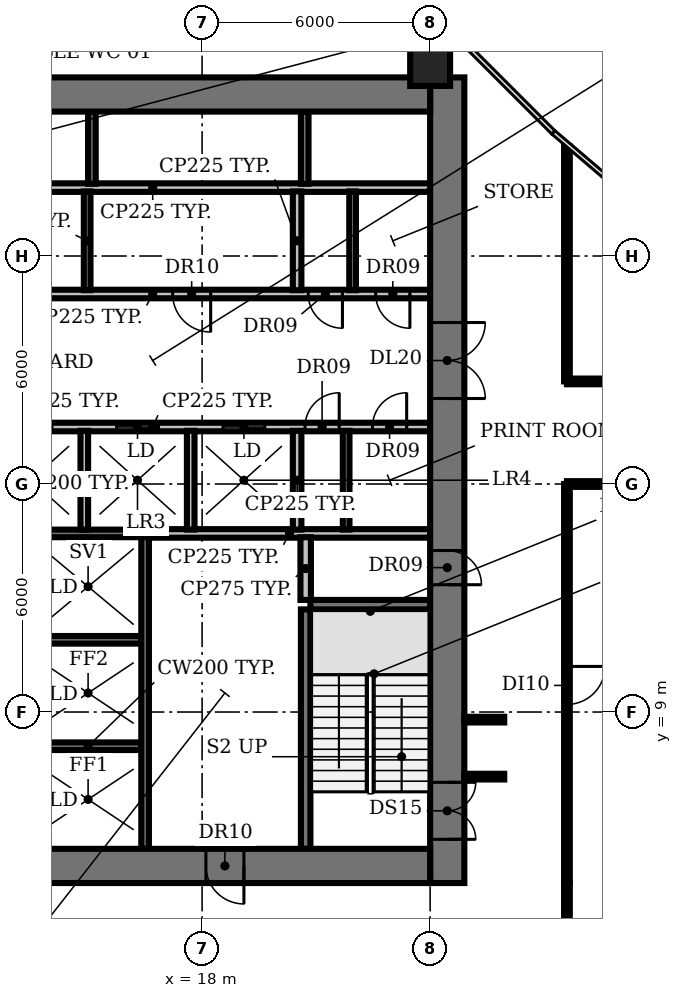
"""IFC4 building model, lengths in metres.
Left out: names, types, materials, properties, quantities, classifications, styles, units other than length and angle.
Written with IfcOpenShell. Run it as: python <this file> out.ifc"""

import sys

from ifc_helpers import new_model, si_unit, direction, frame, frame_2d, origin, origin_2d, place, context, subcontext, project, spatial, rectangle, circle, extrude, element, fill, save


model = new_model("IFC4")
c1 = context("Model", 3, precision=1e-05, world=origin(), true_north=direction((0.0, 1.0)))
c2 = subcontext(c1, "Body", "Model", "MODEL_VIEW")
j1 = project(units=[si_unit("LENGTHUNIT", "METRE"), si_unit("PLANEANGLEUNIT", "RADIAN")], contexts=[c1])
p1 = place(None, origin())
s1 = spatial("IfcSite", under=j1, at=p1, CompositionType="ELEMENT")
p2 = place(p1, origin())
s2 = spatial("IfcBuilding", under=s1, at=p2, CompositionType="ELEMENT")
p3 = place(p2, frame((0.0, 0.0, 71.0)))
s3 = spatial("IfcBuildingStorey", under=s2, at=p3, CompositionType="ELEMENT", Elevation=71.0)
p4 = place(p3, frame((24.0, 26.0, 0.0), z_axis=(0.0, 0.0, 1.0), x_axis=(1.0, 0.0, 0.0)))
e1 = element("IfcColumn", 1, at=p4, inside=s3, PredefinedType="COLUMN", context=c2, shape_type="SweptSolid", body=[
    extrude(circle(Radius=0.525, at=origin_2d()), origin(), (0.0, 0.0, 1.0), 3.85),
])
for number, where, z_axis, x_axis in (
    (2, (13.6, 8.1, 0.0), (0.0, 0.0, 1.0), (1.0, 0.0, 0.0)),
    (3, (13.6, 10.9, 0.0), (0.0, 0.0, 1.0), (1.0, 0.0, 0.0)),
):
    element("IfcWall", number, at=place(p3, frame(where, z_axis=z_axis, x_axis=x_axis)), inside=s3, PredefinedType="SHEAR", context=c2, shape_type="SweptSolid", body=[
        extrude(rectangle(XDim=2.8, YDim=0.2, at=frame_2d((1.4, 0.0))), origin(), (0.0, 0.0, 1.0), 3.85),
    ])
p5 = place(p3, frame((20.85, 11.825, 0.0), z_axis=(0.0, 0.0, 1.0), x_axis=(1.0, 0.0, 0.0)))
e4 = element("IfcWall", 4, at=p5, inside=s3, PredefinedType="SHEAR", context=c2, shape_type="SweptSolid", body=[
    extrude(rectangle(XDim=3.15, YDim=0.25, at=frame_2d((1.575, 0.0))), origin(), (0.0, 0.0, 1.0), 3.85),
])
p6 = place(p3, frame((13.6, 13.7, 0.0), z_axis=(0.0, 0.0, 1.0), x_axis=(1.0, 0.0, 0.0)))
e5 = element("IfcWall", 5, at=p6, inside=s3, PredefinedType="SHEAR", context=c2, shape_type="SweptSolid", body=[
    extrude(rectangle(XDim=2.8, YDim=0.2, at=frame_2d((1.4, 0.0))), origin(), (0.0, 0.0, 1.0), 3.85),
])
p7 = place(p3, frame((16.6, 13.7, 0.0), z_axis=(0.0, 0.0, 1.0), x_axis=(1.0, 0.0, 0.0)))
e6 = element("IfcWall", 6, at=p7, inside=s3, PredefinedType="PARTITIONING", context=c2, shape_type="SweptSolid", body=[
    extrude(rectangle(XDim=7.4, YDim=0.225, at=frame_2d((3.7, 0.0))), origin(), (0.0, 0.0, 1.0), 3.85),
])
p8 = place(p3, frame((9.4, 16.5, 0.0), z_axis=(0.0, 0.0, 1.0), x_axis=(1.0, 0.0, 0.0)))
e7 = element("IfcWall", 7, at=p8, inside=s3, PredefinedType="PARTITIONING", context=c2, shape_type="SweptSolid", body=[
    extrude(rectangle(XDim=14.6, YDim=0.225, at=frame_2d((7.3, 0.0))), origin(), (0.0, 0.0, 1.0), 3.85),
])
p9 = place(p8, frame((0.75, 0.0, 0.0)))
e8 = element("IfcOpeningElement", 8, at=p9, cuts=e7, PredefinedType="OPENING", context=c2, shape_type="SweptSolid", body=[
    extrude(rectangle(XDim=1.1, YDim=2.1, at=frame_2d((0.55, 1.05))), frame((0.0, 0.123, 0.0), z_axis=(0.0, -1.0, 0.0), x_axis=(1.0, 0.0, 0.0)), (0.0, 0.0, 1.0), 0.245),
])
p10 = place(p8, frame((3.55, 0.0, 0.0)))
e9 = element("IfcOpeningElement", 9, at=p10, cuts=e7, PredefinedType="OPENING", context=c2, shape_type="SweptSolid", body=[
    extrude(rectangle(XDim=1.1, YDim=2.1, at=frame_2d((0.55, 1.05))), frame((0.0, 0.123, 0.0), z_axis=(0.0, -1.0, 0.0), x_axis=(1.0, 0.0, 0.0)), (0.0, 0.0, 1.0), 0.245),
])
p11 = place(p8, frame((6.35, 0.0, 0.0)))
e10 = element("IfcOpeningElement", 10, at=p11, cuts=e7, PredefinedType="OPENING", context=c2, shape_type="SweptSolid", body=[
    extrude(rectangle(XDim=1.1, YDim=2.1, at=frame_2d((0.55, 1.05))), frame((0.0, 0.123, 0.0), z_axis=(0.0, -1.0, 0.0), x_axis=(1.0, 0.0, 0.0)), (0.0, 0.0, 1.0), 0.245),
])
p12 = place(p8, frame((9.15, 0.0, 0.0)))
e11 = element("IfcOpeningElement", 11, at=p12, cuts=e7, PredefinedType="OPENING", context=c2, shape_type="SweptSolid", body=[
    extrude(rectangle(XDim=1.1, YDim=2.1, at=frame_2d((0.55, 1.05))), frame((0.0, 0.123, 0.0), z_axis=(0.0, -1.0, 0.0), x_axis=(1.0, 0.0, 0.0)), (0.0, 0.0, 1.0), 0.245),
])
p13 = place(p8, frame((11.308, 0.0, 0.0)))
e12 = element("IfcOpeningElement", 12, at=p13, cuts=e7, PredefinedType="OPENING", context=c2, shape_type="SweptSolid", body=[
    extrude(rectangle(XDim=0.9, YDim=2.1, at=frame_2d((0.45, 1.05))), frame((0.0, 0.123, 0.0), z_axis=(0.0, -1.0, 0.0), x_axis=(1.0, 0.0, 0.0)), (0.0, 0.0, 1.0), 0.245),
])
p14 = place(p8, frame((13.083, 0.0, 0.0)))
e13 = element("IfcOpeningElement", 13, at=p14, cuts=e7, PredefinedType="OPENING", context=c2, shape_type="SweptSolid", body=[
    extrude(rectangle(XDim=0.9, YDim=2.1, at=frame_2d((0.45, 1.05))), frame((0.0, 0.123, 0.0), z_axis=(0.0, -1.0, 0.0), x_axis=(1.0, 0.0, 0.0)), (0.0, 0.0, 1.0), 0.245),
])
p15 = place(p3, frame((24.0, 20.0, 0.0), z_axis=(0.0, 0.0, 1.0), x_axis=(-1.0, 0.0, 0.0)))
e14 = element("IfcWall", 14, at=p15, inside=s3, PredefinedType="PARTITIONING", context=c2, shape_type="SweptSolid", body=[
    extrude(rectangle(XDim=14.6, YDim=0.225, at=frame_2d((7.3, 0.0))), origin(), (0.0, 0.0, 1.0), 3.85),
])
p16 = place(p15, frame((11.35, 0.0, 0.0)))
e15 = element("IfcOpeningElement", 15, at=p16, cuts=e14, PredefinedType="OPENING", context=c2, shape_type="SweptSolid", body=[
    extrude(rectangle(XDim=1.0, YDim=2.1, at=frame_2d((0.5, 1.05))), frame((0.0, 0.123, 0.0), z_axis=(0.0, -1.0, 0.0), x_axis=(1.0, 0.0, 0.0)), (0.0, 0.0, 1.0), 0.245),
])
p17 = place(p15, frame((5.775, 0.0, 0.0)))
e16 = element("IfcOpeningElement", 16, at=p17, cuts=e14, PredefinedType="OPENING", context=c2, shape_type="SweptSolid", body=[
    extrude(rectangle(XDim=1.0, YDim=2.1, at=frame_2d((0.5, 1.05))), frame((0.0, 0.123, 0.0), z_axis=(0.0, -1.0, 0.0), x_axis=(1.0, 0.0, 0.0)), (0.0, 0.0, 1.0), 0.245),
])
p18 = place(p15, frame((2.308, 0.0, 0.0)))
e17 = element("IfcOpeningElement", 17, at=p18, cuts=e14, PredefinedType="OPENING", context=c2, shape_type="SweptSolid", body=[
    extrude(rectangle(XDim=0.9, YDim=2.1, at=frame_2d((0.45, 1.05))), frame((0.0, 0.123, 0.0), z_axis=(0.0, -1.0, 0.0), x_axis=(1.0, 0.0, 0.0)), (0.0, 0.0, 1.0), 0.245),
])
p19 = place(p15, frame((0.532, 0.0, 0.0)))
e18 = element("IfcOpeningElement", 18, at=p19, cuts=e14, PredefinedType="OPENING", context=c2, shape_type="SweptSolid", body=[
    extrude(rectangle(XDim=0.9, YDim=2.1, at=frame_2d((0.45, 1.05))), frame((0.0, 0.123, 0.0), z_axis=(0.0, -1.0, 0.0), x_axis=(1.0, 0.0, 0.0)), (0.0, 0.0, 1.0), 0.245),
])
p20 = place(p3, frame((9.4, 22.8, 0.0), z_axis=(0.0, 0.0, 1.0), x_axis=(1.0, 0.0, 0.0)))
e19 = element("IfcWall", 19, at=p20, inside=s3, PredefinedType="PARTITIONING", context=c2, shape_type="SweptSolid", body=[
    extrude(rectangle(XDim=14.6, YDim=0.225, at=frame_2d((7.3, 0.0))), origin(), (0.0, 0.0, 1.0), 3.85),
])
p21 = place(p3, frame((14.9, 13.8, 0.0), z_axis=(0.0, 0.0, 1.0), x_axis=(0.0, 1.0, 0.0)))
e20 = element("IfcWall", 20, at=p21, inside=s3, PredefinedType="SOLIDWALL", context=c2, shape_type="SweptSolid", body=[
    extrude(rectangle(XDim=2.6, YDim=0.2, at=frame_2d((1.3, 0.0))), origin(), (0.0, 0.0, 1.0), 3.85),
])
p22 = place(p3, frame((14.975, 20.1, 0.0), z_axis=(0.0, 0.0, 1.0), x_axis=(0.0, 1.0, 0.0)))
e21 = element("IfcWall", 21, at=p22, inside=s3, PredefinedType="PARTITIONING", context=c2, shape_type="SweptSolid", body=[
    extrude(rectangle(XDim=2.6, YDim=0.175, at=frame_2d((1.3, 0.0))), origin(), (0.0, 0.0, 1.0), 3.85),
])
p23 = place(p3, frame((15.1, 22.9, 0.0), z_axis=(0.0, 0.0, 1.0), x_axis=(0.0, 1.0, 0.0)))
e22 = element("IfcWall", 22, at=p23, inside=s3, PredefinedType="SHEAR", context=c2, shape_type="SweptSolid", body=[
    extrude(rectangle(XDim=1.9, YDim=0.2, at=frame_2d((0.95, 0.0))), origin(), (0.0, 0.0, 1.0), 3.85),
])
p24 = place(p3, frame((16.5, 5.4, 0.0), z_axis=(0.0, 0.0, 1.0), x_axis=(0.0, 1.0, 0.0)))
e23 = element("IfcWall", 23, at=p24, inside=s3, PredefinedType="SHEAR", context=c2, shape_type="SweptSolid", body=[
    extrude(rectangle(XDim=8.2, YDim=0.2, at=frame_2d((4.1, 0.0))), origin(), (0.0, 0.0, 1.0), 3.85),
])
p25 = place(p3, frame((17.7, 13.8, 0.0), z_axis=(0.0, 0.0, 1.0), x_axis=(0.0, 1.0, 0.0)))
e24 = element("IfcWall", 24, at=p25, inside=s3, PredefinedType="SOLIDWALL", context=c2, shape_type="SweptSolid", body=[
    extrude(rectangle(XDim=2.6, YDim=0.2, at=frame_2d((1.3, 0.0))), origin(), (0.0, 0.0, 1.0), 3.85),
])
for number, where, z_axis, x_axis in (
    (25, (20.5, 13.8, 0.0), (0.0, 0.0, 1.0), (0.0, 1.0, 0.0)),
    (26, (20.5, 20.1, 0.0), (0.0, 0.0, 1.0), (0.0, 1.0, 0.0)),
):
    element("IfcWall", number, at=place(p3, frame(where, z_axis=z_axis, x_axis=x_axis)), inside=s3, PredefinedType="PARTITIONING", context=c2, shape_type="SweptSolid", body=[
        extrude(rectangle(XDim=2.6, YDim=0.225, at=frame_2d((1.3, 0.0))), origin(), (0.0, 0.0, 1.0), 3.85),
    ])
p26 = place(p3, frame((20.7, 22.9, 0.0), z_axis=(0.0, 0.0, 1.0), x_axis=(0.0, 1.0, 0.0)))
e27 = element("IfcWall", 27, at=p26, inside=s3, PredefinedType="SHEAR", context=c2, shape_type="SweptSolid", body=[
    extrude(rectangle(XDim=1.9, YDim=0.2, at=frame_2d((0.95, 0.0))), origin(), (0.0, 0.0, 1.0), 3.85),
])
p27 = place(p3, frame((20.725, 5.4, 0.0), z_axis=(0.0, 0.0, 1.0), x_axis=(0.0, 1.0, 0.0)))
e28 = element("IfcWall", 28, at=p27, inside=s3, PredefinedType="SHEAR", context=c2, shape_type="SweptSolid", body=[
    extrude(rectangle(XDim=6.3, YDim=0.25, at=frame_2d((3.15, 0.0))), origin(), (0.0, 0.0, 1.0), 3.85),
])
p28 = place(p3, frame((20.725, 11.95, 0.0), z_axis=(0.0, 0.0, 1.0), x_axis=(0.0, 1.0, 0.0)))
e29 = element("IfcWall", 29, at=p28, inside=s3, PredefinedType="PARTITIONING", context=c2, shape_type="SweptSolid", body=[
    extrude(rectangle(XDim=1.65, YDim=0.275, at=frame_2d((0.825, 0.0))), origin(), (0.0, 0.0, 1.0), 3.85),
])
for number, where, z_axis, x_axis in (
    (30, (21.79, 13.8, 0.0), (0.0, 0.0, 1.0), (0.0, 1.0, 0.0)),
    (31, (21.96, 20.1, 0.0), (0.0, 0.0, 1.0), (0.0, 1.0, 0.0)),
):
    element("IfcWall", number, at=place(p3, frame(where, z_axis=z_axis, x_axis=x_axis)), inside=s3, PredefinedType="PARTITIONING", context=c2, shape_type="SweptSolid", body=[
        extrude(rectangle(XDim=2.6, YDim=0.175, at=frame_2d((1.3, 0.0))), origin(), (0.0, 0.0, 1.0), 3.85),
    ])
p29 = place(p3, frame((24.45, 25.7, 0.0), z_axis=(0.0, 0.0, 1.0), x_axis=(0.0, -1.0, 0.0)))
e32 = element("IfcWall", 32, at=p29, inside=s3, PredefinedType="SHEAR", context=c2, shape_type="SweptSolid", body=[
    extrude(rectangle(XDim=21.2, YDim=0.9, at=frame_2d((10.6, 0.0))), origin(), (0.0, 0.0, 1.0), 3.85),
])
p30 = place(p29, frame((18.55, 0.0, 0.0)))
e33 = element("IfcOpeningElement", 33, at=p30, cuts=e32, PredefinedType="OPENING", context=c2, shape_type="SweptSolid", body=[
    extrude(rectangle(XDim=1.5, YDim=2.1, at=frame_2d((0.75, 1.05))), frame((0.0, 0.46, 0.0), z_axis=(0.0, -1.0, 0.0), x_axis=(1.0, 0.0, 0.0)), (0.0, 0.0, 1.0), 0.92),
])
p31 = place(p29, frame((12.45, 0.0, 0.0)))
e34 = element("IfcOpeningElement", 34, at=p31, cuts=e32, PredefinedType="OPENING", context=c2, shape_type="SweptSolid", body=[
    extrude(rectangle(XDim=0.9, YDim=2.1, at=frame_2d((0.45, 1.05))), frame((0.0, 0.46, 0.0), z_axis=(0.0, -1.0, 0.0), x_axis=(1.0, 0.0, 0.0)), (0.0, 0.0, 1.0), 0.92),
])
p32 = place(p29, frame((6.45, 0.0, 0.0)))
e35 = element("IfcOpeningElement", 35, at=p32, cuts=e32, PredefinedType="OPENING", context=c2, shape_type="SweptSolid", body=[
    extrude(rectangle(XDim=2.0, YDim=2.1, at=frame_2d((1.0, 1.05))), frame((0.0, 0.46, 0.0), z_axis=(0.0, -1.0, 0.0), x_axis=(1.0, 0.0, 0.0)), (0.0, 0.0, 1.0), 0.92),
])
p33 = place(p3, frame((24.0, 4.95, 0.0), z_axis=(0.0, 0.0, 1.0), x_axis=(-1.0, 0.0, 0.0)))
e36 = element("IfcWall", 36, at=p33, inside=s3, PredefinedType="SHEAR", context=c2, shape_type="SweptSolid", body=[
    extrude(rectangle(XDim=18.0, YDim=0.9, at=frame_2d((9.0, 0.0))), origin(), (0.0, 0.0, 1.0), 3.85),
])
p34 = place(p33, frame((13.0, 0.0, 0.0)))
e37 = element("IfcOpeningElement", 37, at=p34, cuts=e36, PredefinedType="OPENING", context=c2, shape_type="SweptSolid", body=[
    extrude(rectangle(XDim=1.2, YDim=2.1, at=frame_2d((0.6, 1.05))), frame((0.0, 0.46, 0.0), z_axis=(0.0, -1.0, 0.0), x_axis=(1.0, 0.0, 0.0)), (0.0, 0.0, 1.0), 0.92),
])
p35 = place(p33, frame((4.9, 0.0, 0.0)))
e38 = element("IfcOpeningElement", 38, at=p35, cuts=e36, PredefinedType="OPENING", context=c2, shape_type="SweptSolid", body=[
    extrude(rectangle(XDim=1.0, YDim=2.1, at=frame_2d((0.5, 1.05))), frame((0.0, 0.46, 0.0), z_axis=(0.0, -1.0, 0.0), x_axis=(1.0, 0.0, 0.0)), (0.0, 0.0, 1.0), 0.92),
])
p36 = place(p3, frame((6.0, 25.25, 0.0), z_axis=(0.0, 0.0, 1.0), x_axis=(1.0, 0.0, 0.0)))
e39 = element("IfcWall", 39, at=p36, inside=s3, PredefinedType="SHEAR", context=c2, shape_type="SweptSolid", body=[
    extrude(rectangle(XDim=18.0, YDim=0.9, at=frame_2d((9.0, 0.0))), origin(), (0.0, 0.0, 1.0), 3.85),
])
for number, where, z_axis, x_axis in (
    (40, (24.9, 7.3, 0.0), (0.0, 0.0, 1.0), (1.0, 0.0, 0.0)),
    (41, (24.9, 8.8, 0.0), (0.0, 0.0, 1.0), (1.0, 0.0, 0.0)),
):
    element("IfcWall", number, at=place(p3, frame(where, z_axis=z_axis, x_axis=x_axis)), inside=s3, PredefinedType="PARTITIONING", context=c2, shape_type="SweptSolid", body=[
        extrude(rectangle(XDim=1.05, YDim=0.15, at=frame_2d((0.525, 0.0))), origin(), (0.0, 0.0, 1.0), 2.83),
    ])
p37 = place(p3, frame((27.6, 0.6, 0.0), z_axis=(0.0, 0.0, 1.0), x_axis=(0.0, 1.0, 0.0)))
e42 = element("IfcWall", 42, at=p37, inside=s3, PredefinedType="PARTITIONING", context=c2, shape_type="SweptSolid", body=[
    extrude(rectangle(XDim=3.9, YDim=0.15, at=frame_2d((1.95, 0.0))), origin(), (0.0, 0.0, 1.0), 2.83),
])
p38 = place(p3, frame((27.6, 15.0, 0.0), z_axis=(0.0, 0.0, 1.0), x_axis=(0.0, -1.0, 0.0)))
e43 = element("IfcWall", 43, at=p38, inside=s3, PredefinedType="PARTITIONING", context=c2, shape_type="SweptSolid", body=[
    extrude(rectangle(XDim=10.5, YDim=0.15, at=frame_2d((5.25, 0.0))), origin(), (0.0, 0.0, 1.0), 2.83),
])
p39 = place(p38, frame((4.8, 0.0, 0.0)))
e44 = element("IfcOpeningElement", 44, at=p39, cuts=e43, PredefinedType="OPENING", context=c2, shape_type="SweptSolid", body=[
    extrude(rectangle(XDim=1.0, YDim=2.1, at=frame_2d((0.5, 1.05))), frame((0.0, 0.085, 0.0), z_axis=(0.0, -1.0, 0.0), x_axis=(1.0, 0.0, 0.0)), (0.0, 0.0, 1.0), 0.17),
])
p40 = place(p3, frame((27.6, 15.0, 0.0), z_axis=(0.0, 0.0, 1.0), x_axis=(1.0, 0.0, 0.0)))
e45 = element("IfcWall", 45, at=p40, inside=s3, PredefinedType="PARTITIONING", context=c2, shape_type="SweptSolid", body=[
    extrude(rectangle(XDim=8.4, YDim=0.15, at=frame_2d((4.2, 0.0))), origin(), (0.0, 0.0, 1.0), 2.83),
])
p41 = place(p3, frame((27.6, 17.7, 0.0), z_axis=(0.0, 0.0, 1.0), x_axis=(0.0, 1.0, 0.0)))
e46 = element("IfcWall", 46, at=p41, inside=s3, PredefinedType="PARTITIONING", context=c2, shape_type="SweptSolid", body=[
    extrude(rectangle(XDim=6.18, YDim=0.15, at=frame_2d((3.09, 0.0))), origin(), (0.0, 0.0, 1.0), 2.83),
])
p42 = place(p3, frame((42.0, 17.7, 0.0), z_axis=(0.0, 0.0, 1.0), x_axis=(-1.0, 0.0, 0.0)))
e47 = element("IfcWall", 47, at=p42, inside=s3, PredefinedType="PARTITIONING", context=c2, shape_type="SweptSolid", body=[
    extrude(rectangle(XDim=14.4, YDim=0.15, at=frame_2d((7.2, 0.0))), origin(), (0.0, 0.0, 1.0), 2.83),
])
p43 = place(p42, frame((7.1, 0.0, 0.0)))
e48 = element("IfcOpeningElement", 48, at=p43, cuts=e47, PredefinedType="OPENING", context=c2, shape_type="SweptSolid", body=[
    extrude(rectangle(XDim=1.8, YDim=2.1, at=frame_2d((0.9, 1.05))), frame((0.0, 0.085, 0.0), z_axis=(0.0, -1.0, 0.0), x_axis=(1.0, 0.0, 0.0)), (0.0, 0.0, 1.0), 0.17),
])
p44 = place(p11, origin())
e49 = element("IfcDoor", 49, at=p44, inside=s3, OperationType="DOUBLE_DOOR_SLIDING", PredefinedType="DOOR", context=c2, shape_type="SweptSolid", body=[
    extrude(rectangle(XDim=1.1, YDim=2.1, at=frame_2d((0.55, 1.05))), frame((0.0, 0.025, 0.0), z_axis=(0.0, -1.0, 0.0), x_axis=(1.0, 0.0, 0.0)), (0.0, 0.0, 1.0), 0.05),
])
fill(e10, e49)
p45 = place(p12, origin())
e50 = element("IfcDoor", 50, at=p45, inside=s3, OperationType="DOUBLE_DOOR_SLIDING", PredefinedType="DOOR", context=c2, shape_type="SweptSolid", body=[
    extrude(rectangle(XDim=1.1, YDim=2.1, at=frame_2d((0.55, 1.05))), frame((0.0, 0.025, 0.0), z_axis=(0.0, -1.0, 0.0), x_axis=(1.0, 0.0, 0.0)), (0.0, 0.0, 1.0), 0.05),
])
fill(e11, e50)
p46 = place(p13, origin())
e51 = element("IfcDoor", 51, at=p46, inside=s3, OperationType="SINGLE_SWING_RIGHT", PredefinedType="DOOR", context=c2, shape_type="SweptSolid", body=[
    extrude(rectangle(XDim=0.9, YDim=2.1, at=frame_2d((0.45, 1.05))), frame((0.0, 0.025, 0.0), z_axis=(0.0, -1.0, 0.0), x_axis=(1.0, 0.0, 0.0)), (0.0, 0.0, 1.0), 0.05),
])
fill(e12, e51)
p47 = place(p14, origin())
e52 = element("IfcDoor", 52, at=p47, inside=s3, OperationType="SINGLE_SWING_RIGHT", PredefinedType="DOOR", context=c2, shape_type="SweptSolid", body=[
    extrude(rectangle(XDim=0.9, YDim=2.1, at=frame_2d((0.45, 1.05))), frame((0.0, 0.025, 0.0), z_axis=(0.0, -1.0, 0.0), x_axis=(1.0, 0.0, 0.0)), (0.0, 0.0, 1.0), 0.05),
])
fill(e13, e52)
p48 = place(p17, origin())
e53 = element("IfcDoor", 53, at=p48, inside=s3, OperationType="SINGLE_SWING_LEFT", PredefinedType="DOOR", context=c2, shape_type="SweptSolid", body=[
    extrude(rectangle(XDim=1.0, YDim=2.1, at=frame_2d((0.5, 1.05))), frame((0.0, 0.025, 0.0), z_axis=(0.0, -1.0, 0.0), x_axis=(1.0, 0.0, 0.0)), (0.0, 0.0, 1.0), 0.05),
])
fill(e16, e53)
p49 = place(p18, origin())
e54 = element("IfcDoor", 54, at=p49, inside=s3, OperationType="SINGLE_SWING_LEFT", PredefinedType="DOOR", context=c2, shape_type="SweptSolid", body=[
    extrude(rectangle(XDim=0.9, YDim=2.1, at=frame_2d((0.45, 1.05))), frame((0.0, 0.025, 0.0), z_axis=(0.0, -1.0, 0.0), x_axis=(1.0, 0.0, 0.0)), (0.0, 0.0, 1.0), 0.05),
])
fill(e17, e54)
p50 = place(p19, origin())
e55 = element("IfcDoor", 55, at=p50, inside=s3, OperationType="SINGLE_SWING_LEFT", PredefinedType="DOOR", context=c2, shape_type="SweptSolid", body=[
    extrude(rectangle(XDim=0.9, YDim=2.1, at=frame_2d((0.45, 1.05))), frame((0.0, 0.025, 0.0), z_axis=(0.0, -1.0, 0.0), x_axis=(1.0, 0.0, 0.0)), (0.0, 0.0, 1.0), 0.05),
])
fill(e18, e55)
p51 = place(p30, origin())
e56 = element("IfcDoor", 56, at=p51, inside=s3, OperationType="DOUBLE_DOOR_SINGLE_SWING", PredefinedType="DOOR", context=c2, shape_type="SweptSolid", body=[
    extrude(rectangle(XDim=1.5, YDim=2.1, at=frame_2d((0.75, 1.05))), frame((0.0, 0.025, 0.0), z_axis=(0.0, -1.0, 0.0), x_axis=(1.0, 0.0, 0.0)), (0.0, 0.0, 1.0), 0.05),
])
fill(e33, e56)
p52 = place(p31, origin())
e57 = element("IfcDoor", 57, at=p52, inside=s3, OperationType="SINGLE_SWING_RIGHT", PredefinedType="DOOR", context=c2, shape_type="SweptSolid", body=[
    extrude(rectangle(XDim=0.9, YDim=2.1, at=frame_2d((0.45, 1.05))), frame((0.0, -0.39, 0.0), z_axis=(0.0, -1.0, 0.0), x_axis=(1.0, 0.0, 0.0)), (0.0, 0.0, 1.0), 0.05),
])
fill(e34, e57)
p53 = place(p32, origin())
e58 = element("IfcDoor", 58, at=p53, inside=s3, OperationType="DOUBLE_DOOR_SINGLE_SWING", PredefinedType="DOOR", context=c2, shape_type="SweptSolid", body=[
    extrude(rectangle(XDim=2.0, YDim=2.1, at=frame_2d((1.0, 1.05))), frame((0.0, 0.025, 0.0), z_axis=(0.0, -1.0, 0.0), x_axis=(1.0, 0.0, 0.0)), (0.0, 0.0, 1.0), 0.05),
])
fill(e35, e58)
p54 = place(p35, origin())
e59 = element("IfcDoor", 59, at=p54, inside=s3, OperationType="SINGLE_SWING_LEFT", PredefinedType="DOOR", context=c2, shape_type="SweptSolid", body=[
    extrude(rectangle(XDim=1.0, YDim=2.1, at=frame_2d((0.5, 1.05))), frame((0.0, -0.39, 0.0), z_axis=(0.0, -1.0, 0.0), x_axis=(1.0, 0.0, 0.0)), (0.0, 0.0, 1.0), 0.05),
])
fill(e38, e59)
p55 = place(p39, origin())
e60 = element("IfcDoor", 60, at=p55, inside=s3, OperationType="SINGLE_SWING_LEFT", PredefinedType="DOOR", context=c2, shape_type="SweptSolid", body=[
    extrude(rectangle(XDim=1.0, YDim=2.1, at=frame_2d((0.5, 1.05))), frame((0.0, 0.025, 0.0), z_axis=(0.0, -1.0, 0.0), x_axis=(1.0, 0.0, 0.0)), (0.0, 0.0, 1.0), 0.05),
])
fill(e44, e60)
save(model, sys.argv[1])
